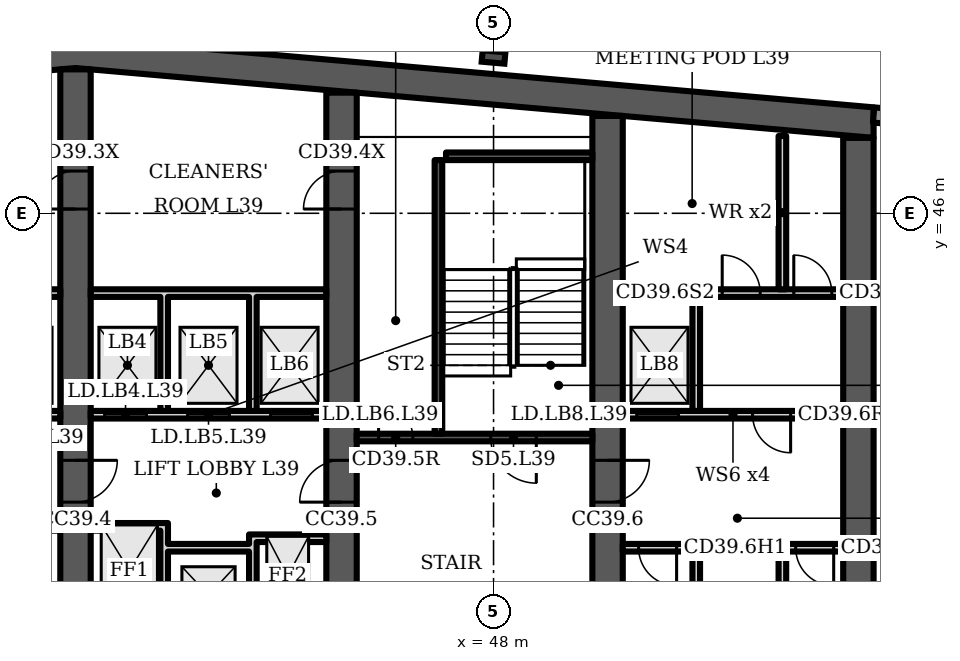
"""IFC4 building model, lengths in metres.
Left out: names, types, materials, properties, quantities, classifications, styles, units other than length and angle.
Written with IfcOpenShell. Run it as: python <this file> out.ifc"""

import sys

from ifc_helpers import new_model, si_unit, direction, frame, frame_2d, origin, origin_2d, place, context, subcontext, project, spatial, polyline, rectangle, i_section, outline, extrude, element, fill, save


model = new_model("IFC4")
c1 = context("Model", 3, precision=1e-05, world=origin(), true_north=direction((0.0, 1.0)))
c2 = subcontext(c1, "Body", "Model", "MODEL_VIEW")
j1 = project(units=[si_unit("LENGTHUNIT", "METRE"), si_unit("PLANEANGLEUNIT", "RADIAN")], contexts=[c1])
p1 = place(None, origin())
s1 = spatial("IfcSite", under=j1, at=p1, CompositionType="ELEMENT")
p2 = place(p1, origin())
s2 = spatial("IfcBuilding", under=s1, at=p2, CompositionType="ELEMENT")
p3 = place(p2, frame((0.0, 0.0, 162.7)))
s3 = spatial("IfcBuildingStorey", under=s2, at=p3, CompositionType="ELEMENT", Elevation=162.7)
p4 = place(p3, origin())
e1 = element("IfcWall", 1, at=p4, inside=s3, PredefinedType="SHEAR", context=c2, shape_type="SweptSolid", body=[
    extrude(outline(polyline([(16.0, 47.984), (37.0, 49.822), (58.0, 47.984), (58.0, 48.787), (37.0, 50.625), (16.0, 48.787), (16.0, 47.984)])), origin(), (0.0, 0.0, 1.0), 3.6),
])
p5 = place(p3, frame((37.0, 34.8, 0.0), z_axis=(0.0, 0.0, 1.0), x_axis=(0.0, 1.0, 0.0)))
e2 = element("IfcWall", 2, at=p5, inside=s3, PredefinedType="SHEAR", context=c2, shape_type="SweptSolid", body=[
    extrude(rectangle(XDim=14.987, YDim=0.8, at=frame_2d((7.493, 0.0))), origin(), (0.0, 0.0, 1.0), 3.6),
])
p6 = place(p5, frame((11.312, 0.0, 0.0)))
e3 = element("IfcOpeningElement", 3, at=p6, cuts=e2, PredefinedType="OPENING", context=c2, shape_type="SweptSolid", body=[
    extrude(rectangle(XDim=1.0, YDim=2.1, at=frame_2d((0.5, 1.05))), frame((0.0, 0.41, 0.0), z_axis=(0.0, -1.0, 0.0), x_axis=(1.0, 0.0, 0.0)), (0.0, 0.0, 1.0), 0.82),
])
p7 = place(p5, frame((3.6, 0.0, 0.0)))
e4 = element("IfcOpeningElement", 4, at=p7, cuts=e2, PredefinedType="OPENING", context=c2, shape_type="SweptSolid", body=[
    extrude(rectangle(XDim=1.1, YDim=2.1, at=frame_2d((0.55, 1.05))), frame((0.0, 0.41, 0.0), z_axis=(0.0, -1.0, 0.0), x_axis=(1.0, 0.0, 0.0)), (0.0, 0.0, 1.0), 0.82),
])
p8 = place(p3, frame((44.0, 34.8, 0.0), z_axis=(0.0, 0.0, 1.0), x_axis=(0.0, 1.0, 0.0)))
e5 = element("IfcWall", 5, at=p8, inside=s3, PredefinedType="SHEAR", context=c2, shape_type="SweptSolid", body=[
    extrude(rectangle(XDim=14.374, YDim=0.8, at=frame_2d((7.187, 0.0))), origin(), (0.0, 0.0, 1.0), 3.6),
])
p9 = place(p8, frame((11.312, 0.0, 0.0)))
e6 = element("IfcOpeningElement", 6, at=p9, cuts=e5, PredefinedType="OPENING", context=c2, shape_type="SweptSolid", body=[
    extrude(rectangle(XDim=1.0, YDim=2.1, at=frame_2d((0.5, 1.05))), frame((0.0, 0.41, 0.0), z_axis=(0.0, -1.0, 0.0), x_axis=(1.0, 0.0, 0.0)), (0.0, 0.0, 1.0), 0.82),
])
p10 = place(p8, frame((3.6, 0.0, 0.0)))
e7 = element("IfcOpeningElement", 7, at=p10, cuts=e5, PredefinedType="OPENING", context=c2, shape_type="SweptSolid", body=[
    extrude(rectangle(XDim=1.1, YDim=2.1, at=frame_2d((0.55, 1.05))), frame((0.0, 0.41, 0.0), z_axis=(0.0, -1.0, 0.0), x_axis=(1.0, 0.0, 0.0)), (0.0, 0.0, 1.0), 0.82),
])
p11 = place(p3, frame((51.0, 34.8, 0.0), z_axis=(0.0, 0.0, 1.0), x_axis=(0.0, 1.0, 0.0)))
e8 = element("IfcWall", 8, at=p11, inside=s3, PredefinedType="SHEAR", context=c2, shape_type="SweptSolid", body=[
    extrude(rectangle(XDim=13.762, YDim=0.8, at=frame_2d((6.881, 0.0))), origin(), (0.0, 0.0, 1.0), 3.6),
])
p12 = place(p11, frame((3.6, 0.0, 0.0)))
e9 = element("IfcOpeningElement", 9, at=p12, cuts=e8, PredefinedType="OPENING", context=c2, shape_type="SweptSolid", body=[
    extrude(rectangle(XDim=1.1, YDim=2.1, at=frame_2d((0.55, 1.05))), frame((0.0, 0.41, 0.0), z_axis=(0.0, -1.0, 0.0), x_axis=(1.0, 0.0, 0.0)), (0.0, 0.0, 1.0), 0.82),
])
p13 = place(p3, frame((57.6, 34.8, 0.0), z_axis=(0.0, 0.0, 1.0), x_axis=(0.0, 1.0, 0.0)))
e10 = element("IfcWall", 10, at=p13, inside=s3, PredefinedType="SHEAR", context=c2, shape_type="SweptSolid", body=[
    extrude(rectangle(XDim=13.184, YDim=0.8, at=frame_2d((6.592, 0.0))), origin(), (0.0, 0.0, 1.0), 3.6),
])
p14 = place(p3, frame((48.0, 50.112, 0.0), z_axis=(0.0, 0.0, 1.0), x_axis=(0.087156, 0.996198, 0.0)))
e11 = element("IfcColumn", 11, at=p14, inside=s3, PredefinedType="COLUMN", context=c2, shape_type="SweptSolid", body=[
    extrude(i_section(OverallWidth=0.3, OverallDepth=0.6, WebThickness=0.015, FlangeThickness=0.03, FilletRadius=0.027, at=origin_2d()), origin(), (0.0, 0.0, 1.0), 3.6),
])
p15 = place(p3, frame((60.983, 48.326, 0.0), z_axis=(0.0, 0.0, 1.0), x_axis=(-0.996194, 0.087168, 0.0)))
e12 = element("IfcWall", 12, at=p15, inside=s3, PredefinedType="SOLIDWALL", context=c2, shape_type="SweptSolid", body=[
    extrude(rectangle(XDim=2.994, YDim=0.4, at=frame_2d((1.497, 0.0))), origin(), (0.0, 0.0, 1.0), 3.2),
])
p16 = place(p3, frame((30.4, 40.7, 0.0), z_axis=(0.0, 0.0, 1.0), x_axis=(1.0, 0.0, 0.0)))
e13 = element("IfcWall", 13, at=p16, inside=s3, PredefinedType="PARTITIONING", context=c2, shape_type="SweptSolid", body=[
    extrude(rectangle(XDim=6.2, YDim=0.2, at=frame_2d((3.1, 0.0))), origin(), (0.0, 0.0, 1.0), 3.2),
])
p17 = place(p16, frame((0.367, 0.0, 0.0)))
e14 = element("IfcOpeningElement", 14, at=p17, cuts=e13, PredefinedType="OPENING", context=c2, shape_type="SweptSolid", body=[
    extrude(rectangle(XDim=1.1, YDim=2.1, at=frame_2d((0.55, 1.05))), frame((0.0, 0.11, 0.0), z_axis=(0.0, -1.0, 0.0), x_axis=(1.0, 0.0, 0.0)), (0.0, 0.0, 1.0), 0.22),
])
p18 = place(p16, frame((2.55, 0.0, 0.0)))
e15 = element("IfcOpeningElement", 15, at=p18, cuts=e13, PredefinedType="OPENING", context=c2, shape_type="SweptSolid", body=[
    extrude(rectangle(XDim=1.1, YDim=2.1, at=frame_2d((0.55, 1.05))), frame((0.0, 0.11, 0.0), z_axis=(0.0, -1.0, 0.0), x_axis=(1.0, 0.0, 0.0)), (0.0, 0.0, 1.0), 0.22),
])
p19 = place(p16, frame((4.733, 0.0, 0.0)))
e16 = element("IfcOpeningElement", 16, at=p19, cuts=e13, PredefinedType="OPENING", context=c2, shape_type="SweptSolid", body=[
    extrude(rectangle(XDim=1.1, YDim=2.1, at=frame_2d((0.55, 1.05))), frame((0.0, 0.11, 0.0), z_axis=(0.0, -1.0, 0.0), x_axis=(1.0, 0.0, 0.0)), (0.0, 0.0, 1.0), 0.22),
])
p20 = place(p3, frame((0.0, 0.0, -0.0)))
e17 = element("IfcWall", 17, at=p20, inside=s3, PredefinedType="PARTITIONING", context=c2, shape_type="SweptSolid", body=[
    extrude(outline(polyline([(34.567, 37.85), (34.767, 37.85), (36.6, 37.85), (36.6, 37.65), (34.767, 37.65), (34.767, 34.8), (34.567, 34.8), (34.567, 37.85)])), origin(), (0.0, 0.0, 1.0), 3.2),
])
p21 = place(p3, frame((0.0, 0.0, -0.0)))
e18 = element("IfcWall", 18, at=p21, inside=s3, PredefinedType="PARTITIONING", context=c2, shape_type="SweptSolid", body=[
    extrude(outline(polyline([(32.433, 40.8), (32.233, 40.8), (32.233, 43.8), (30.4, 43.8), (30.4, 44.0), (36.6, 44.0), (36.6, 43.8), (34.767, 43.8), (34.767, 40.8), (34.567, 40.8), (34.567, 43.8), (32.433, 43.8), (32.433, 40.8)])), origin(), (0.0, 0.0, 1.0), 3.2),
])
p22 = place(p3, frame((37.4, 40.7, 0.0), z_axis=(0.0, 0.0, 1.0), x_axis=(1.0, 0.0, 0.0)))
e19 = element("IfcWall", 19, at=p22, inside=s3, PredefinedType="PARTITIONING", context=c2, shape_type="SweptSolid", body=[
    extrude(rectangle(XDim=6.2, YDim=0.2, at=frame_2d((3.1, 0.0))), origin(), (0.0, 0.0, 1.0), 3.2),
])
p23 = place(p22, frame((0.367, 0.0, 0.0)))
e20 = element("IfcOpeningElement", 20, at=p23, cuts=e19, PredefinedType="OPENING", context=c2, shape_type="SweptSolid", body=[
    extrude(rectangle(XDim=1.1, YDim=2.1, at=frame_2d((0.55, 1.05))), frame((0.0, 0.11, 0.0), z_axis=(0.0, -1.0, 0.0), x_axis=(1.0, 0.0, 0.0)), (0.0, 0.0, 1.0), 0.22),
])
p24 = place(p22, frame((2.55, 0.0, 0.0)))
e21 = element("IfcOpeningElement", 21, at=p24, cuts=e19, PredefinedType="OPENING", context=c2, shape_type="SweptSolid", body=[
    extrude(rectangle(XDim=1.1, YDim=2.1, at=frame_2d((0.55, 1.05))), frame((0.0, 0.11, 0.0), z_axis=(0.0, -1.0, 0.0), x_axis=(1.0, 0.0, 0.0)), (0.0, 0.0, 1.0), 0.22),
])
p25 = place(p22, frame((4.733, 0.0, 0.0)))
e22 = element("IfcOpeningElement", 22, at=p25, cuts=e19, PredefinedType="OPENING", context=c2, shape_type="SweptSolid", body=[
    extrude(rectangle(XDim=1.1, YDim=2.1, at=frame_2d((0.55, 1.05))), frame((0.0, 0.11, 0.0), z_axis=(0.0, -1.0, 0.0), x_axis=(1.0, 0.0, 0.0)), (0.0, 0.0, 1.0), 0.22),
])
p26 = place(p3, frame((0.0, 0.0, -0.0)))
e23 = element("IfcWall", 23, at=p26, inside=s3, PredefinedType="PARTITIONING", context=c2, shape_type="SweptSolid", body=[
    extrude(outline(polyline([(41.567, 37.1), (39.433, 37.1), (39.433, 34.8), (39.233, 34.8), (39.233, 37.65), (37.4, 37.65), (37.4, 37.85), (39.233, 37.85), (39.433, 37.85), (39.433, 37.3), (41.567, 37.3), (41.567, 37.55), (41.767, 37.55), (43.6, 37.55), (43.6, 37.35), (41.767, 37.35), (41.767, 34.8), (41.567, 34.8), (41.567, 37.1)])), origin(), (0.0, 0.0, 1.0), 3.2),
])
p27 = place(p3, frame((0.0, 0.0, -0.0)))
e24 = element("IfcWall", 24, at=p27, inside=s3, PredefinedType="PARTITIONING", context=c2, shape_type="SweptSolid", body=[
    extrude(outline(polyline([(39.433, 40.8), (39.233, 40.8), (39.233, 43.8), (37.4, 43.8), (37.4, 44.0), (43.6, 44.0), (43.6, 43.8), (41.767, 43.8), (41.767, 40.8), (41.567, 40.8), (41.567, 43.8), (39.433, 43.8), (39.433, 40.8)])), origin(), (0.0, 0.0, 1.0), 3.2),
])
p28 = place(p3, frame((44.4, 40.1, 0.0), z_axis=(0.0, 0.0, 1.0), x_axis=(1.0, 0.0, 0.0)))
e25 = element("IfcWall", 25, at=p28, inside=s3, PredefinedType="SHEAR", context=c2, shape_type="SweptSolid", body=[
    extrude(rectangle(XDim=6.2, YDim=0.2, at=frame_2d((3.1, 0.0))), origin(), (0.0, 0.0, 1.0), 3.2),
])
p29 = place(p28, frame((3.525, 0.0, 0.0)))
e26 = element("IfcOpeningElement", 26, at=p29, cuts=e25, PredefinedType="OPENING", context=c2, shape_type="SweptSolid", body=[
    extrude(rectangle(XDim=1.2, YDim=2.1, at=frame_2d((0.6, 1.05))), frame((0.0, 0.11, 0.0), z_axis=(0.0, -1.0, 0.0), x_axis=(1.0, 0.0, 0.0)), (0.0, 0.0, 1.0), 0.22),
])
p30 = place(p28, frame((0.575, 0.0, 0.0)))
e27 = element("IfcOpeningElement", 27, at=p30, cuts=e25, PredefinedType="OPENING", context=c2, shape_type="SweptSolid", body=[
    extrude(rectangle(XDim=0.9, YDim=2.1, at=frame_2d((0.45, 1.05))), frame((0.0, 0.11, 0.0), z_axis=(0.0, -1.0, 0.0), x_axis=(1.0, 0.0, 0.0)), (0.0, 0.0, 1.0), 0.22),
])
p31 = place(p3, frame((46.55, 40.2, 0.0), z_axis=(0.0, 0.0, 1.0), x_axis=(0.0, 1.0, 0.0)))
e28 = element("IfcWall", 28, at=p31, inside=s3, PredefinedType="SHEAR", context=c2, shape_type="SweptSolid", body=[
    extrude(rectangle(XDim=7.2, YDim=0.2, at=frame_2d((3.6, 0.0))), origin(), (0.0, 0.0, 1.0), 3.2),
])
p32 = place(p3, frame((46.75, 47.5, 0.0), z_axis=(0.0, 0.0, 1.0), x_axis=(1.0, 0.0, 0.0)))
e29 = element("IfcWall", 29, at=p32, inside=s3, PredefinedType="SHEAR", context=c2, shape_type="SweptSolid", body=[
    extrude(rectangle(XDim=3.85, YDim=0.2, at=frame_2d((1.925, 0.0))), origin(), (0.0, 0.0, 1.0), 3.2),
])
p33 = place(p3, frame((51.4, 37.2, 0.0), z_axis=(0.0, 0.0, 1.0), x_axis=(1.0, 0.0, 0.0)))
e30 = element("IfcWall", 30, at=p33, inside=s3, PredefinedType="PARTITIONING", context=c2, shape_type="SweptSolid", body=[
    extrude(rectangle(XDim=1.833, YDim=0.2, at=frame_2d((0.917, 0.0))), origin(), (0.0, 0.0, 1.0), 3.2),
])
p34 = place(p33, frame((0.417, 0.0, 0.0)))
e31 = element("IfcOpeningElement", 31, at=p34, cuts=e30, PredefinedType="OPENING", context=c2, shape_type="SweptSolid", body=[
    extrude(rectangle(XDim=1.0, YDim=2.1, at=frame_2d((0.5, 1.05))), frame((0.0, 0.11, 0.0), z_axis=(0.0, -1.0, 0.0), x_axis=(1.0, 0.0, 0.0)), (0.0, 0.0, 1.0), 0.22),
])
p35 = place(p3, frame((55.7, 37.2, 0.0), z_axis=(0.0, 0.0, 1.0), x_axis=(1.0, 0.0, 0.0)))
e32 = element("IfcWall", 32, at=p35, inside=s3, PredefinedType="PARTITIONING", context=c2, shape_type="SweptSolid", body=[
    extrude(rectangle(XDim=1.5, YDim=0.2, at=frame_2d((0.75, 0.0))), origin(), (0.0, 0.0, 1.0), 3.2),
])
p36 = place(p35, frame((0.25, 0.0, 0.0)))
e33 = element("IfcOpeningElement", 33, at=p36, cuts=e32, PredefinedType="OPENING", context=c2, shape_type="SweptSolid", body=[
    extrude(rectangle(XDim=1.0, YDim=2.1, at=frame_2d((0.5, 1.05))), frame((0.0, 0.11, 0.0), z_axis=(0.0, -1.0, 0.0), x_axis=(1.0, 0.0, 0.0)), (0.0, 0.0, 1.0), 0.22),
])
p37 = place(p3, frame((51.4, 40.7, 0.0), z_axis=(0.0, 0.0, 1.0), x_axis=(1.0, 0.0, 0.0)))
e34 = element("IfcWall", 34, at=p37, inside=s3, PredefinedType="PARTITIONING", context=c2, shape_type="SweptSolid", body=[
    extrude(rectangle(XDim=5.8, YDim=0.2, at=frame_2d((2.9, 0.0))), origin(), (0.0, 0.0, 1.0), 3.2),
])
p38 = place(p37, frame((0.367, 0.0, 0.0)))
e35 = element("IfcOpeningElement", 35, at=p38, cuts=e34, PredefinedType="OPENING", context=c2, shape_type="SweptSolid", body=[
    extrude(rectangle(XDim=1.1, YDim=2.1, at=frame_2d((0.55, 1.05))), frame((0.0, 0.11, 0.0), z_axis=(0.0, -1.0, 0.0), x_axis=(1.0, 0.0, 0.0)), (0.0, 0.0, 1.0), 0.22),
])
p39 = place(p37, frame((3.417, 0.0, 0.0)))
e36 = element("IfcOpeningElement", 36, at=p39, cuts=e34, PredefinedType="OPENING", context=c2, shape_type="SweptSolid", body=[
    extrude(rectangle(XDim=1.0, YDim=2.1, at=frame_2d((0.5, 1.05))), frame((0.0, 0.11, 0.0), z_axis=(0.0, -1.0, 0.0), x_axis=(1.0, 0.0, 0.0)), (0.0, 0.0, 1.0), 0.22),
])
p40 = place(p3, frame((51.4, 43.9, 0.0), z_axis=(0.0, 0.0, 1.0), x_axis=(1.0, 0.0, 0.0)))
e37 = element("IfcWall", 37, at=p40, inside=s3, PredefinedType="PARTITIONING", context=c2, shape_type="SweptSolid", body=[
    extrude(rectangle(XDim=5.8, YDim=0.2, at=frame_2d((2.9, 0.0))), origin(), (0.0, 0.0, 1.0), 3.2),
])
p41 = place(p40, frame((2.617, 0.0, 0.0)))
e38 = element("IfcOpeningElement", 38, at=p41, cuts=e37, PredefinedType="OPENING", context=c2, shape_type="SweptSolid", body=[
    extrude(rectangle(XDim=1.0, YDim=2.1, at=frame_2d((0.5, 1.05))), frame((0.0, 0.11, 0.0), z_axis=(0.0, -1.0, 0.0), x_axis=(1.0, 0.0, 0.0)), (0.0, 0.0, 1.0), 0.22),
])
p42 = place(p40, frame((4.5, 0.0, 0.0)))
e39 = element("IfcOpeningElement", 39, at=p42, cuts=e37, PredefinedType="OPENING", context=c2, shape_type="SweptSolid", body=[
    extrude(rectangle(XDim=1.0, YDim=2.1, at=frame_2d((0.5, 1.05))), frame((0.0, 0.11, 0.0), z_axis=(0.0, -1.0, 0.0), x_axis=(1.0, 0.0, 0.0)), (0.0, 0.0, 1.0), 0.22),
])
p43 = place(p3, frame((0.0, 0.0, -0.0)))
e40 = element("IfcWall", 40, at=p43, inside=s3, PredefinedType="PARTITIONING", context=c2, shape_type="SweptSolid", body=[
    extrude(outline(polyline([(53.233, 34.8), (53.233, 37.3), (53.433, 37.3), (53.433, 34.8), (53.233, 34.8)])), origin(), (0.0, 0.0, 1.0), 3.2),
])
p44 = place(p3, frame((0.0, 0.0, -0.0)))
e41 = element("IfcWall", 41, at=p44, inside=s3, PredefinedType="PARTITIONING", context=c2, shape_type="SweptSolid", body=[
    extrude(outline(polyline([(55.5, 34.8), (55.5, 37.3), (55.7, 37.3), (55.7, 34.8), (55.5, 34.8)])), origin(), (0.0, 0.0, 1.0), 3.2),
])
p45 = place(p3, frame((0.0, 0.0, -0.0)))
e42 = element("IfcWall", 42, at=p45, inside=s3, PredefinedType="PARTITIONING", context=c2, shape_type="SweptSolid", body=[
    extrude(outline(polyline([(53.433, 40.8), (53.433, 43.8), (53.233, 43.8), (53.233, 40.8), (53.433, 40.8)])), origin(), (0.0, 0.0, 1.0), 3.2),
])
p46 = place(p3, frame((55.6, 44.0, 0.0), z_axis=(0.0, 0.0, 1.0), x_axis=(0.0, 1.0, 0.0)))
e43 = element("IfcWall", 43, at=p46, inside=s3, PredefinedType="PARTITIONING", context=c2, shape_type="SweptSolid", body=[
    extrude(rectangle(XDim=4.034, YDim=0.2, at=frame_2d((2.017, 0.0))), origin(), (0.0, 0.0, 1.0), 3.2),
])
p47 = place(p6, origin())
e44 = element("IfcDoor", 44, at=p47, inside=s3, OperationType="SINGLE_SWING_LEFT", PredefinedType="DOOR", context=c2, shape_type="SweptSolid", body=[
    extrude(rectangle(XDim=1.0, YDim=2.1, at=frame_2d((0.5, 1.05))), frame((0.0, 0.4, 0.0), z_axis=(0.0, -1.0, 0.0), x_axis=(1.0, 0.0, 0.0)), (0.0, 0.0, 1.0), 0.8),
])
fill(e3, e44)
p48 = place(p23, origin())
e45 = element("IfcDoor", 45, at=p48, inside=s3, OperationType="DOUBLE_DOOR_SLIDING", PredefinedType="DOOR", context=c2, shape_type="SweptSolid", body=[
    extrude(rectangle(XDim=1.1, YDim=2.1, at=frame_2d((0.55, 1.05))), frame((0.0, 0.025, 0.0), z_axis=(0.0, -1.0, 0.0), x_axis=(1.0, 0.0, 0.0)), (0.0, 0.0, 1.0), 0.05),
])
fill(e20, e45)
p49 = place(p24, origin())
e46 = element("IfcDoor", 46, at=p49, inside=s3, OperationType="DOUBLE_DOOR_SLIDING", PredefinedType="DOOR", context=c2, shape_type="SweptSolid", body=[
    extrude(rectangle(XDim=1.1, YDim=2.1, at=frame_2d((0.55, 1.05))), frame((0.0, 0.025, 0.0), z_axis=(0.0, -1.0, 0.0), x_axis=(1.0, 0.0, 0.0)), (0.0, 0.0, 1.0), 0.05),
])
fill(e21, e46)
p50 = place(p25, origin())
e47 = element("IfcDoor", 47, at=p50, inside=s3, OperationType="DOUBLE_DOOR_SLIDING", PredefinedType="DOOR", context=c2, shape_type="SweptSolid", body=[
    extrude(rectangle(XDim=1.1, YDim=2.1, at=frame_2d((0.55, 1.05))), frame((0.0, 0.025, 0.0), z_axis=(0.0, -1.0, 0.0), x_axis=(1.0, 0.0, 0.0)), (0.0, 0.0, 1.0), 0.05),
])
fill(e22, e47)
p51 = place(p9, origin())
e48 = element("IfcDoor", 48, at=p51, inside=s3, OperationType="SINGLE_SWING_LEFT", PredefinedType="DOOR", context=c2, shape_type="SweptSolid", body=[
    extrude(rectangle(XDim=1.0, YDim=2.1, at=frame_2d((0.5, 1.05))), frame((0.0, 0.4, 0.0), z_axis=(0.0, -1.0, 0.0), x_axis=(1.0, 0.0, 0.0)), (0.0, 0.0, 1.0), 0.8),
])
fill(e6, e48)
p52 = place(p29, origin())
e49 = element("IfcDoor", 49, at=p52, inside=s3, OperationType="SINGLE_SWING_RIGHT", PredefinedType="DOOR", context=c2, shape_type="SweptSolid", body=[
    extrude(rectangle(XDim=1.2, YDim=2.1, at=frame_2d((0.6, 1.05))), frame((0.0, 0.025, 0.0), z_axis=(0.0, -1.0, 0.0), x_axis=(1.0, 0.0, 0.0)), (0.0, 0.0, 1.0), 0.05),
])
fill(e26, e49)
p53 = place(p30, origin())
e50 = element("IfcDoor", 50, at=p53, inside=s3, OperationType="SINGLE_SWING_LEFT", PredefinedType="DOOR", context=c2, shape_type="SweptSolid", body=[
    extrude(rectangle(XDim=0.9, YDim=2.1, at=frame_2d((0.45, 1.05))), frame((0.0, 0.025, 0.0), z_axis=(0.0, -1.0, 0.0), x_axis=(1.0, 0.0, 0.0)), (0.0, 0.0, 1.0), 0.05),
])
fill(e27, e50)
p54 = place(p34, origin())
e51 = element("IfcDoor", 51, at=p54, inside=s3, OperationType="SINGLE_SWING_RIGHT", PredefinedType="DOOR", context=c2, shape_type="SweptSolid", body=[
    extrude(rectangle(XDim=1.0, YDim=2.1, at=frame_2d((0.5, 1.05))), frame((0.0, 0.025, 0.0), z_axis=(0.0, -1.0, 0.0), x_axis=(1.0, 0.0, 0.0)), (0.0, 0.0, 1.0), 0.05),
])
fill(e31, e51)
p55 = place(p36, origin())
e52 = element("IfcDoor", 52, at=p55, inside=s3, OperationType="SINGLE_SWING_RIGHT", PredefinedType="DOOR", context=c2, shape_type="SweptSolid", body=[
    extrude(rectangle(XDim=1.0, YDim=2.1, at=frame_2d((0.5, 1.05))), frame((0.0, 0.025, 0.0), z_axis=(0.0, -1.0, 0.0), x_axis=(1.0, 0.0, 0.0)), (0.0, 0.0, 1.0), 0.05),
])
fill(e33, e52)
p56 = place(p38, origin())
e53 = element("IfcDoor", 53, at=p56, inside=s3, OperationType="DOUBLE_DOOR_SLIDING", PredefinedType="DOOR", context=c2, shape_type="SweptSolid", body=[
    extrude(rectangle(XDim=1.1, YDim=2.1, at=frame_2d((0.55, 1.05))), frame((0.0, 0.025, 0.0), z_axis=(0.0, -1.0, 0.0), x_axis=(1.0, 0.0, 0.0)), (0.0, 0.0, 1.0), 0.05),
])
fill(e35, e53)
p57 = place(p39, origin())
e54 = element("IfcDoor", 54, at=p57, inside=s3, OperationType="SINGLE_SWING_RIGHT", PredefinedType="DOOR", context=c2, shape_type="SweptSolid", body=[
    extrude(rectangle(XDim=1.0, YDim=2.1, at=frame_2d((0.5, 1.05))), frame((0.0, 0.025, 0.0), z_axis=(0.0, -1.0, 0.0), x_axis=(1.0, 0.0, 0.0)), (0.0, 0.0, 1.0), 0.05),
])
fill(e36, e54)
p58 = place(p41, origin())
e55 = element("IfcDoor", 55, at=p58, inside=s3, OperationType="SINGLE_SWING_LEFT", PredefinedType="DOOR", context=c2, shape_type="SweptSolid", body=[
    extrude(rectangle(XDim=1.0, YDim=2.1, at=frame_2d((0.5, 1.05))), frame((0.0, 0.025, 0.0), z_axis=(0.0, -1.0, 0.0), x_axis=(1.0, 0.0, 0.0)), (0.0, 0.0, 1.0), 0.05),
])
fill(e38, e55)
p59 = place(p42, origin())
e56 = element("IfcDoor", 56, at=p59, inside=s3, OperationType="SINGLE_SWING_LEFT", PredefinedType="DOOR", context=c2, shape_type="SweptSolid", body=[
    extrude(rectangle(XDim=1.0, YDim=2.1, at=frame_2d((0.5, 1.05))), frame((0.0, 0.025, 0.0), z_axis=(0.0, -1.0, 0.0), x_axis=(1.0, 0.0, 0.0)), (0.0, 0.0, 1.0), 0.05),
])
fill(e39, e56)
p60 = place(p7, origin())
e57 = element("IfcDoor", 57, at=p60, inside=s3, OperationType="SINGLE_SWING_RIGHT", PredefinedType="DOOR", context=c2, shape_type="SweptSolid", body=[
    extrude(rectangle(XDim=1.1, YDim=2.1, at=frame_2d((0.55, 1.05))), frame((0.0, 0.025, 0.0), z_axis=(0.0, -1.0, 0.0), x_axis=(1.0, 0.0, 0.0)), (0.0, 0.0, 1.0), 0.05),
])
fill(e4, e57)
p61 = place(p10, origin())
e58 = element("IfcDoor", 58, at=p61, inside=s3, OperationType="SINGLE_SWING_LEFT", PredefinedType="DOOR", context=c2, shape_type="SweptSolid", body=[
    extrude(rectangle(XDim=1.1, YDim=2.1, at=frame_2d((0.55, 1.05))), frame((0.0, 0.025, 0.0), z_axis=(0.0, -1.0, 0.0), x_axis=(1.0, 0.0, 0.0)), (0.0, 0.0, 1.0), 0.05),
])
fill(e7, e58)
p62 = place(p12, origin())
e59 = element("IfcDoor", 59, at=p62, inside=s3, OperationType="SINGLE_SWING_RIGHT", PredefinedType="DOOR", context=c2, shape_type="SweptSolid", body=[
    extrude(rectangle(XDim=1.1, YDim=2.1, at=frame_2d((0.55, 1.05))), frame((0.0, 0.025, 0.0), z_axis=(0.0, -1.0, 0.0), x_axis=(1.0, 0.0, 0.0)), (0.0, 0.0, 1.0), 0.05),
])
fill(e9, e59)
save(model, sys.argv[1])
